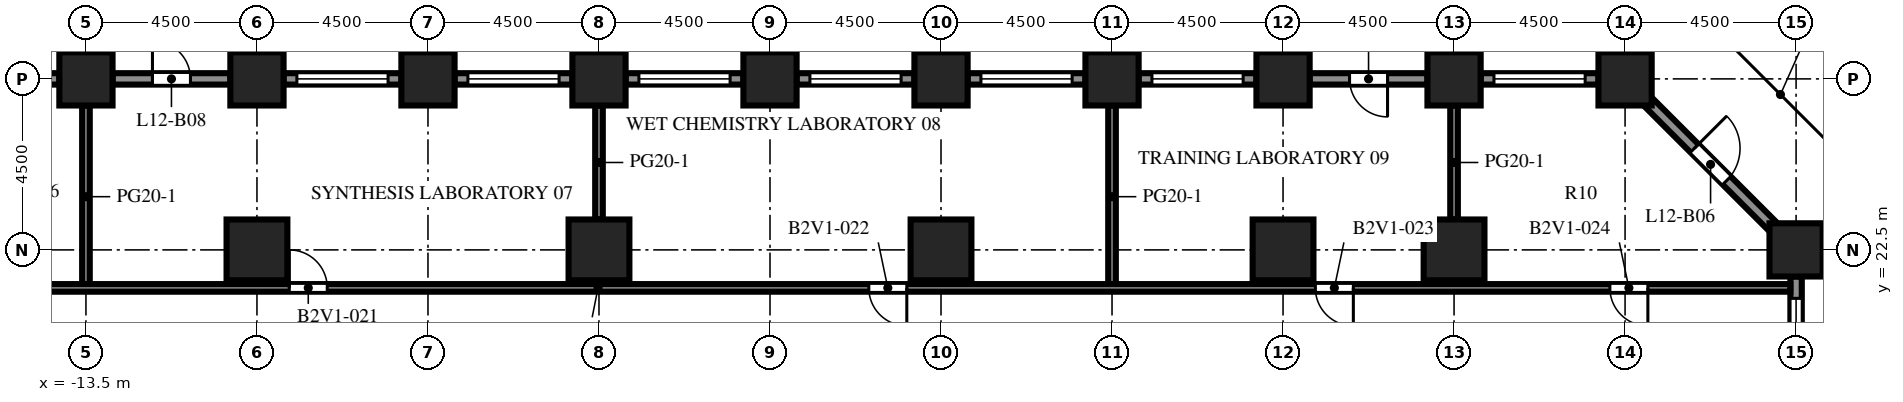
"""IFC4 building model, lengths in metres.
Left out: names, types, materials, properties, quantities, classifications, styles, units other than length and angle.
Written with IfcOpenShell. Run it as: python <this file> out.ifc"""

import sys

from ifc_helpers import new_model, si_unit, direction, frame, frame_2d, origin, origin_2d, place, context, subcontext, project, spatial, rectangle, extrude, element, fill, save


model = new_model("IFC4")
c1 = context("Model", 3, precision=1e-05, world=origin(), true_north=direction((0.0, 1.0)))
c2 = subcontext(c1, "Body", "Model", "MODEL_VIEW")
j1 = project(units=[si_unit("LENGTHUNIT", "METRE"), si_unit("PLANEANGLEUNIT", "RADIAN")], contexts=[c1])
p1 = place(None, origin())
s1 = spatial("IfcSite", under=j1, at=p1, CompositionType="ELEMENT")
p2 = place(p1, origin())
s2 = spatial("IfcBuilding", under=s1, at=p2, CompositionType="ELEMENT")
p3 = place(p2, frame((0.0, 0.0, 54.2)))
s3 = spatial("IfcBuildingStorey", under=s2, at=p3, CompositionType="ELEMENT", Elevation=54.2)
for number, where, z_axis, x_axis in (
    (1, (-13.5, 27.0, 0.0), (0.0, 0.0, 1.0), (1.0, 0.0, 0.0)),
    (2, (-9.0, 27.0, 0.0), (0.0, 0.0, 1.0), (1.0, 0.0, 0.0)),
    (3, (-4.5, 27.0, 0.0), (0.0, 0.0, 1.0), (1.0, 0.0, 0.0)),
    (4, (0.0, 27.0, 0.0), (0.0, 0.0, 1.0), (1.0, 0.0, 0.0)),
    (5, (4.5, 27.0, 0.0), (0.0, 0.0, 1.0), (1.0, 0.0, 0.0)),
    (6, (9.0, 27.0, 0.0), (0.0, 0.0, 1.0), (1.0, 0.0, 0.0)),
    (7, (13.5, 27.0, 0.0), (0.0, 0.0, 1.0), (1.0, 0.0, 0.0)),
    (8, (18.0, 27.0, 0.0), (0.0, 0.0, 1.0), (1.0, 0.0, 0.0)),
    (9, (22.5, 27.0, 0.0), (0.0, 0.0, 1.0), (1.0, 0.0, 0.0)),
    (10, (27.0, 27.0, 0.0), (0.0, 0.0, 1.0), (1.0, 0.0, 0.0)),
    (11, (31.5, 22.5, 0.0), (0.0, 0.0, 1.0), (1.0, 0.0, 0.0)),
):
    element("IfcColumn", number, at=place(p3, frame(where, z_axis=z_axis, x_axis=x_axis)), inside=s3, PredefinedType="COLUMN", context=c2, shape_type="SweptSolid", body=[
        extrude(rectangle(XDim=1.4, YDim=1.4, at=origin_2d()), origin(), (0.0, 0.0, 1.0), 4.1),
    ])
for number, where, z_axis, x_axis in (
    (12, (-9.0, 22.5, 0.0), (0.0, 0.0, 1.0), (1.0, 0.0, 0.0)),
    (13, (0.0, 22.5, 0.0), (0.0, 0.0, 1.0), (1.0, 0.0, 0.0)),
    (14, (9.0, 22.5, 0.0), (0.0, 0.0, 1.0), (1.0, 0.0, 0.0)),
    (15, (18.0, 22.5, 0.0), (0.0, 0.0, 1.0), (1.0, 0.0, 0.0)),
    (16, (22.5, 22.5, 0.0), (0.0, 0.0, 1.0), (1.0, 0.0, 0.0)),
):
    element("IfcColumn", number, at=place(p3, frame(where, z_axis=z_axis, x_axis=x_axis)), inside=s3, PredefinedType="COLUMN", context=c2, shape_type="SweptSolid", body=[
        extrude(rectangle(XDim=1.6, YDim=1.6, at=origin_2d()), origin(), (0.0, 0.0, 1.0), 4.1),
    ])
p4 = place(p3, frame((31.5, 21.8, 0.0), z_axis=(0.0, 0.0, 1.0), x_axis=(0.0, -1.0, 0.0)))
e17 = element("IfcWall", 17, at=p4, inside=s3, PredefinedType="SOLIDWALL", context=c2, shape_type="SweptSolid", body=[
    extrude(rectangle(XDim=3.1, YDim=0.3, at=frame_2d((1.55, 0.0))), origin(), (0.0, 0.0, 1.0), 2.75),
])
p5 = place(p4, frame((0.575, 0.0, 0.8)))
e18 = element("IfcOpeningElement", 18, at=p5, cuts=e17, PredefinedType="OPENING", context=c2, shape_type="SweptSolid", body=[
    extrude(rectangle(XDim=2.4, YDim=1.7, at=frame_2d((1.2, 0.85))), frame((0.0, 0.16, 0.0), z_axis=(0.0, -1.0, 0.0), x_axis=(1.0, 0.0, 0.0)), (0.0, 0.0, 1.0), 0.32),
])
p6 = place(p3, frame((27.594, 26.406, 0.0), z_axis=(0.0, 0.0, 1.0), x_axis=(0.707106781187, -0.707106781187, 0.0)))
e19 = element("IfcWall", 19, at=p6, inside=s3, PredefinedType="SOLIDWALL", context=c2, shape_type="SweptSolid", body=[
    extrude(rectangle(XDim=4.684, YDim=0.3, at=frame_2d((2.342, 0.0))), origin(), (0.0, 0.0, 1.0), 2.75),
])
p7 = place(p6, frame((1.742, 0.0, 0.0)))
e20 = element("IfcOpeningElement", 20, at=p7, cuts=e19, PredefinedType="OPENING", context=c2, shape_type="SweptSolid", body=[
    extrude(rectangle(XDim=1.2, YDim=2.2, at=frame_2d((0.6, 1.1))), frame((0.0, 0.16, 0.0), z_axis=(0.0, -1.0, 0.0), x_axis=(1.0, 0.0, 0.0)), (0.0, 0.0, 1.0), 0.32),
])
p8 = place(p3, frame((23.2, 27.0, 0.0), z_axis=(0.0, 0.0, 1.0), x_axis=(1.0, 0.0, 0.0)))
e21 = element("IfcWall", 21, at=p8, inside=s3, PredefinedType="SOLIDWALL", context=c2, shape_type="SweptSolid", body=[
    extrude(rectangle(XDim=3.1, YDim=0.3, at=frame_2d((1.55, 0.0))), origin(), (0.0, 0.0, 1.0), 2.75),
])
p9 = place(p8, frame((0.35, 0.0, 0.8)))
e22 = element("IfcOpeningElement", 22, at=p9, cuts=e21, PredefinedType="OPENING", context=c2, shape_type="SweptSolid", body=[
    extrude(rectangle(XDim=2.4, YDim=1.7, at=frame_2d((1.2, 0.85))), frame((0.0, 0.16, 0.0), z_axis=(0.0, -1.0, 0.0), x_axis=(1.0, 0.0, 0.0)), (0.0, 0.0, 1.0), 0.32),
])
p10 = place(p3, frame((18.7, 27.0, 0.0), z_axis=(0.0, 0.0, 1.0), x_axis=(1.0, 0.0, 0.0)))
e23 = element("IfcWall", 23, at=p10, inside=s3, PredefinedType="SOLIDWALL", context=c2, shape_type="SweptSolid", body=[
    extrude(rectangle(XDim=3.1, YDim=0.3, at=frame_2d((1.55, 0.0))), origin(), (0.0, 0.0, 1.0), 2.75),
])
p11 = place(p10, frame((1.05, 0.0, 0.0)))
e24 = element("IfcOpeningElement", 24, at=p11, cuts=e23, PredefinedType="OPENING", context=c2, shape_type="SweptSolid", body=[
    extrude(rectangle(XDim=1.0, YDim=2.2, at=frame_2d((0.5, 1.1))), frame((0.0, 0.16, 0.0), z_axis=(0.0, -1.0, 0.0), x_axis=(1.0, 0.0, 0.0)), (0.0, 0.0, 1.0), 0.32),
])
p12 = place(p3, frame((14.2, 27.0, 0.0), z_axis=(0.0, 0.0, 1.0), x_axis=(1.0, 0.0, 0.0)))
e25 = element("IfcWall", 25, at=p12, inside=s3, PredefinedType="SOLIDWALL", context=c2, shape_type="SweptSolid", body=[
    extrude(rectangle(XDim=3.1, YDim=0.3, at=frame_2d((1.55, 0.0))), origin(), (0.0, 0.0, 1.0), 2.75),
])
p13 = place(p12, frame((0.35, 0.0, 0.8)))
e26 = element("IfcOpeningElement", 26, at=p13, cuts=e25, PredefinedType="OPENING", context=c2, shape_type="SweptSolid", body=[
    extrude(rectangle(XDim=2.4, YDim=1.7, at=frame_2d((1.2, 0.85))), frame((0.0, 0.16, 0.0), z_axis=(0.0, -1.0, 0.0), x_axis=(1.0, 0.0, 0.0)), (0.0, 0.0, 1.0), 0.32),
])
p14 = place(p3, frame((9.7, 27.0, 0.0), z_axis=(0.0, 0.0, 1.0), x_axis=(1.0, 0.0, 0.0)))
e27 = element("IfcWall", 27, at=p14, inside=s3, PredefinedType="SOLIDWALL", context=c2, shape_type="SweptSolid", body=[
    extrude(rectangle(XDim=3.1, YDim=0.3, at=frame_2d((1.55, 0.0))), origin(), (0.0, 0.0, 1.0), 2.75),
])
p15 = place(p14, frame((0.35, 0.0, 0.8)))
e28 = element("IfcOpeningElement", 28, at=p15, cuts=e27, PredefinedType="OPENING", context=c2, shape_type="SweptSolid", body=[
    extrude(rectangle(XDim=2.4, YDim=1.7, at=frame_2d((1.2, 0.85))), frame((0.0, 0.16, 0.0), z_axis=(0.0, -1.0, 0.0), x_axis=(1.0, 0.0, 0.0)), (0.0, 0.0, 1.0), 0.32),
])
p16 = place(p3, frame((5.2, 27.0, 0.0), z_axis=(0.0, 0.0, 1.0), x_axis=(1.0, 0.0, 0.0)))
e29 = element("IfcWall", 29, at=p16, inside=s3, PredefinedType="SOLIDWALL", context=c2, shape_type="SweptSolid", body=[
    extrude(rectangle(XDim=3.1, YDim=0.3, at=frame_2d((1.55, 0.0))), origin(), (0.0, 0.0, 1.0), 2.75),
])
p17 = place(p16, frame((0.35, 0.0, 0.8)))
e30 = element("IfcOpeningElement", 30, at=p17, cuts=e29, PredefinedType="OPENING", context=c2, shape_type="SweptSolid", body=[
    extrude(rectangle(XDim=2.4, YDim=1.7, at=frame_2d((1.2, 0.85))), frame((0.0, 0.16, 0.0), z_axis=(0.0, -1.0, 0.0), x_axis=(1.0, 0.0, 0.0)), (0.0, 0.0, 1.0), 0.32),
])
p18 = place(p3, frame((0.7, 27.0, 0.0), z_axis=(0.0, 0.0, 1.0), x_axis=(1.0, 0.0, 0.0)))
e31 = element("IfcWall", 31, at=p18, inside=s3, PredefinedType="SOLIDWALL", context=c2, shape_type="SweptSolid", body=[
    extrude(rectangle(XDim=3.1, YDim=0.3, at=frame_2d((1.55, 0.0))), origin(), (0.0, 0.0, 1.0), 2.75),
])
p19 = place(p18, frame((0.35, 0.0, 0.8)))
e32 = element("IfcOpeningElement", 32, at=p19, cuts=e31, PredefinedType="OPENING", context=c2, shape_type="SweptSolid", body=[
    extrude(rectangle(XDim=2.4, YDim=1.7, at=frame_2d((1.2, 0.85))), frame((0.0, 0.16, 0.0), z_axis=(0.0, -1.0, 0.0), x_axis=(1.0, 0.0, 0.0)), (0.0, 0.0, 1.0), 0.32),
])
p20 = place(p3, frame((-3.8, 27.0, 0.0), z_axis=(0.0, 0.0, 1.0), x_axis=(1.0, 0.0, 0.0)))
e33 = element("IfcWall", 33, at=p20, inside=s3, PredefinedType="SOLIDWALL", context=c2, shape_type="SweptSolid", body=[
    extrude(rectangle(XDim=3.1, YDim=0.3, at=frame_2d((1.55, 0.0))), origin(), (0.0, 0.0, 1.0), 2.75),
])
p21 = place(p20, frame((0.35, 0.0, 0.8)))
e34 = element("IfcOpeningElement", 34, at=p21, cuts=e33, PredefinedType="OPENING", context=c2, shape_type="SweptSolid", body=[
    extrude(rectangle(XDim=2.4, YDim=1.7, at=frame_2d((1.2, 0.85))), frame((0.0, 0.16, 0.0), z_axis=(0.0, -1.0, 0.0), x_axis=(1.0, 0.0, 0.0)), (0.0, 0.0, 1.0), 0.32),
])
p22 = place(p3, frame((-8.3, 27.0, 0.0), z_axis=(0.0, 0.0, 1.0), x_axis=(1.0, 0.0, 0.0)))
e35 = element("IfcWall", 35, at=p22, inside=s3, PredefinedType="SOLIDWALL", context=c2, shape_type="SweptSolid", body=[
    extrude(rectangle(XDim=3.1, YDim=0.3, at=frame_2d((1.55, 0.0))), origin(), (0.0, 0.0, 1.0), 2.75),
])
p23 = place(p22, frame((0.35, 0.0, 0.8)))
e36 = element("IfcOpeningElement", 36, at=p23, cuts=e35, PredefinedType="OPENING", context=c2, shape_type="SweptSolid", body=[
    extrude(rectangle(XDim=2.4, YDim=1.7, at=frame_2d((1.2, 0.85))), frame((0.0, 0.16, 0.0), z_axis=(0.0, -1.0, 0.0), x_axis=(1.0, 0.0, 0.0)), (0.0, 0.0, 1.0), 0.32),
])
p24 = place(p3, frame((-12.8, 27.0, 0.0), z_axis=(0.0, 0.0, 1.0), x_axis=(1.0, 0.0, 0.0)))
e37 = element("IfcWall", 37, at=p24, inside=s3, PredefinedType="SOLIDWALL", context=c2, shape_type="SweptSolid", body=[
    extrude(rectangle(XDim=3.1, YDim=0.3, at=frame_2d((1.55, 0.0))), origin(), (0.0, 0.0, 1.0), 2.75),
])
p25 = place(p24, frame((1.05, 0.0, 0.0)))
e38 = element("IfcOpeningElement", 38, at=p25, cuts=e37, PredefinedType="OPENING", context=c2, shape_type="SweptSolid", body=[
    extrude(rectangle(XDim=1.0, YDim=2.2, at=frame_2d((0.5, 1.1))), frame((0.0, 0.16, 0.0), z_axis=(0.0, -1.0, 0.0), x_axis=(1.0, 0.0, 0.0)), (0.0, 0.0, 1.0), 0.32),
])
p26 = place(p3, frame((-17.3, 27.0, 0.0), z_axis=(0.0, 0.0, 1.0), x_axis=(1.0, 0.0, 0.0)))
e39 = element("IfcWall", 39, at=p26, inside=s3, PredefinedType="SOLIDWALL", context=c2, shape_type="SweptSolid", body=[
    extrude(rectangle(XDim=3.1, YDim=0.3, at=frame_2d((1.55, 0.0))), origin(), (0.0, 0.0, 1.0), 2.75),
])
p27 = place(p26, frame((0.35, 0.0, 0.8)))
e40 = element("IfcOpeningElement", 40, at=p27, cuts=e39, PredefinedType="OPENING", context=c2, shape_type="SweptSolid", body=[
    extrude(rectangle(XDim=2.4, YDim=1.7, at=frame_2d((1.2, 0.85))), frame((0.0, 0.16, 0.0), z_axis=(0.0, -1.0, 0.0), x_axis=(1.0, 0.0, 0.0)), (0.0, 0.0, 1.0), 0.32),
])
p28 = place(p3, frame((-13.5, 21.5, 0.0), z_axis=(0.0, 0.0, 1.0), x_axis=(0.0, 1.0, 0.0)))
e41 = element("IfcWall", 41, at=p28, inside=s3, PredefinedType="PARTITIONING", context=c2, shape_type="SweptSolid", body=[
    extrude(rectangle(XDim=4.8, YDim=0.2, at=frame_2d((2.4, 0.0))), origin(), (0.0, 0.0, 1.0), 3.65),
])
p29 = place(p3, frame((0.0, 23.3, 0.0), z_axis=(0.0, 0.0, 1.0), x_axis=(0.0, 1.0, 0.0)))
e42 = element("IfcWall", 42, at=p29, inside=s3, PredefinedType="PARTITIONING", context=c2, shape_type="SweptSolid", body=[
    extrude(rectangle(XDim=3.0, YDim=0.2, at=frame_2d((1.5, 0.0))), origin(), (0.0, 0.0, 1.0), 3.65),
])
p30 = place(p3, frame((13.5, 21.5, 0.0), z_axis=(0.0, 0.0, 1.0), x_axis=(0.0, 1.0, 0.0)))
e43 = element("IfcWall", 43, at=p30, inside=s3, PredefinedType="PARTITIONING", context=c2, shape_type="SweptSolid", body=[
    extrude(rectangle(XDim=4.8, YDim=0.2, at=frame_2d((2.4, 0.0))), origin(), (0.0, 0.0, 1.0), 3.65),
])
p31 = place(p3, frame((22.5, 23.3, 0.0), z_axis=(0.0, 0.0, 1.0), x_axis=(0.0, 1.0, 0.0)))
e44 = element("IfcWall", 44, at=p31, inside=s3, PredefinedType="PARTITIONING", context=c2, shape_type="SweptSolid", body=[
    extrude(rectangle(XDim=3.0, YDim=0.2, at=frame_2d((1.5, 0.0))), origin(), (0.0, 0.0, 1.0), 3.65),
])
p32 = place(p3, frame((-22.35, 21.5, 0.0), z_axis=(0.0, 0.0, 1.0), x_axis=(1.0, 0.0, 0.0)))
e45 = element("IfcWall", 45, at=p32, inside=s3, PredefinedType="PARTITIONING", context=c2, shape_type="SweptSolid", body=[
    extrude(rectangle(XDim=53.7, YDim=0.2, at=frame_2d((26.85, 0.0))), origin(), (0.0, 0.0, 1.0), 3.65),
])
p33 = place(p32, frame((3.7, 0.0, 0.0)))
e46 = element("IfcOpeningElement", 46, at=p33, cuts=e45, PredefinedType="OPENING", context=c2, shape_type="SweptSolid", body=[
    extrude(rectangle(XDim=1.0, YDim=2.1, at=frame_2d((0.5, 1.05))), frame((0.0, 0.11, 0.0), z_axis=(0.0, -1.0, 0.0), x_axis=(1.0, 0.0, 0.0)), (0.0, 0.0, 1.0), 0.22),
])
p34 = place(p32, frame((14.2, 0.0, 0.0)))
e47 = element("IfcOpeningElement", 47, at=p34, cuts=e45, PredefinedType="OPENING", context=c2, shape_type="SweptSolid", body=[
    extrude(rectangle(XDim=1.0, YDim=2.1, at=frame_2d((0.5, 1.05))), frame((0.0, 0.11, 0.0), z_axis=(0.0, -1.0, 0.0), x_axis=(1.0, 0.0, 0.0)), (0.0, 0.0, 1.0), 0.22),
])
p35 = place(p32, frame((29.45, 0.0, 0.0)))
e48 = element("IfcOpeningElement", 48, at=p35, cuts=e45, PredefinedType="OPENING", context=c2, shape_type="SweptSolid", body=[
    extrude(rectangle(XDim=1.0, YDim=2.1, at=frame_2d((0.5, 1.05))), frame((0.0, 0.11, 0.0), z_axis=(0.0, -1.0, 0.0), x_axis=(1.0, 0.0, 0.0)), (0.0, 0.0, 1.0), 0.22),
])
p36 = place(p32, frame((41.2, 0.0, 0.0)))
e49 = element("IfcOpeningElement", 49, at=p36, cuts=e45, PredefinedType="OPENING", context=c2, shape_type="SweptSolid", body=[
    extrude(rectangle(XDim=1.0, YDim=2.1, at=frame_2d((0.5, 1.05))), frame((0.0, 0.11, 0.0), z_axis=(0.0, -1.0, 0.0), x_axis=(1.0, 0.0, 0.0)), (0.0, 0.0, 1.0), 0.22),
])
p37 = place(p32, frame((48.95, 0.0, 0.0)))
e50 = element("IfcOpeningElement", 50, at=p37, cuts=e45, PredefinedType="OPENING", context=c2, shape_type="SweptSolid", body=[
    extrude(rectangle(XDim=1.0, YDim=2.1, at=frame_2d((0.5, 1.05))), frame((0.0, 0.11, 0.0), z_axis=(0.0, -1.0, 0.0), x_axis=(1.0, 0.0, 0.0)), (0.0, 0.0, 1.0), 0.22),
])
p38 = place(p5, origin())
e51 = element("IfcWindow", 51, at=p38, inside=s3, PartitioningType="SINGLE_PANEL", PredefinedType="WINDOW", context=c2, shape_type="SweptSolid", body=[
    extrude(rectangle(XDim=2.4, YDim=1.7, at=frame_2d((1.2, 0.85))), frame((0.0, 0.03, 0.0), z_axis=(0.0, -1.0, 0.0), x_axis=(1.0, 0.0, 0.0)), (0.0, 0.0, 1.0), 0.06),
])
fill(e18, e51)
p39 = place(p7, origin())
e52 = element("IfcDoor", 52, at=p39, inside=s3, OperationType="SINGLE_SWING_LEFT", PredefinedType="DOOR", context=c2, shape_type="SweptSolid", body=[
    extrude(rectangle(XDim=1.2, YDim=2.2, at=frame_2d((0.6, 1.1))), frame((0.0, 0.025, 0.0), z_axis=(0.0, -1.0, 0.0), x_axis=(1.0, 0.0, 0.0)), (0.0, 0.0, 1.0), 0.05),
])
fill(e20, e52)
p40 = place(p9, origin())
e53 = element("IfcWindow", 53, at=p40, inside=s3, PartitioningType="SINGLE_PANEL", PredefinedType="WINDOW", context=c2, shape_type="SweptSolid", body=[
    extrude(rectangle(XDim=2.4, YDim=1.7, at=frame_2d((1.2, 0.85))), frame((0.0, 0.03, 0.0), z_axis=(0.0, -1.0, 0.0), x_axis=(1.0, 0.0, 0.0)), (0.0, 0.0, 1.0), 0.06),
])
fill(e22, e53)
p41 = place(p11, origin())
e54 = element("IfcDoor", 54, at=p41, inside=s3, OperationType="SINGLE_SWING_RIGHT", PredefinedType="DOOR", context=c2, shape_type="SweptSolid", body=[
    extrude(rectangle(XDim=1.0, YDim=2.2, at=frame_2d((0.5, 1.1))), frame((0.0, 0.025, 0.0), z_axis=(0.0, -1.0, 0.0), x_axis=(1.0, 0.0, 0.0)), (0.0, 0.0, 1.0), 0.05),
])
fill(e24, e54)
p42 = place(p13, origin())
e55 = element("IfcWindow", 55, at=p42, inside=s3, PartitioningType="SINGLE_PANEL", PredefinedType="WINDOW", context=c2, shape_type="SweptSolid", body=[
    extrude(rectangle(XDim=2.4, YDim=1.7, at=frame_2d((1.2, 0.85))), frame((0.0, 0.03, 0.0), z_axis=(0.0, -1.0, 0.0), x_axis=(1.0, 0.0, 0.0)), (0.0, 0.0, 1.0), 0.06),
])
fill(e26, e55)
p43 = place(p15, origin())
e56 = element("IfcWindow", 56, at=p43, inside=s3, PartitioningType="SINGLE_PANEL", PredefinedType="WINDOW", context=c2, shape_type="SweptSolid", body=[
    extrude(rectangle(XDim=2.4, YDim=1.7, at=frame_2d((1.2, 0.85))), frame((0.0, 0.03, 0.0), z_axis=(0.0, -1.0, 0.0), x_axis=(1.0, 0.0, 0.0)), (0.0, 0.0, 1.0), 0.06),
])
fill(e28, e56)
p44 = place(p17, origin())
e57 = element("IfcWindow", 57, at=p44, inside=s3, PartitioningType="SINGLE_PANEL", PredefinedType="WINDOW", context=c2, shape_type="SweptSolid", body=[
    extrude(rectangle(XDim=2.4, YDim=1.7, at=frame_2d((1.2, 0.85))), frame((0.0, 0.03, 0.0), z_axis=(0.0, -1.0, 0.0), x_axis=(1.0, 0.0, 0.0)), (0.0, 0.0, 1.0), 0.06),
])
fill(e30, e57)
p45 = place(p19, origin())
e58 = element("IfcWindow", 58, at=p45, inside=s3, PartitioningType="SINGLE_PANEL", PredefinedType="WINDOW", context=c2, shape_type="SweptSolid", body=[
    extrude(rectangle(XDim=2.4, YDim=1.7, at=frame_2d((1.2, 0.85))), frame((0.0, 0.03, 0.0), z_axis=(0.0, -1.0, 0.0), x_axis=(1.0, 0.0, 0.0)), (0.0, 0.0, 1.0), 0.06),
])
fill(e32, e58)
p46 = place(p21, origin())
e59 = element("IfcWindow", 59, at=p46, inside=s3, PartitioningType="SINGLE_PANEL", PredefinedType="WINDOW", context=c2, shape_type="SweptSolid", body=[
    extrude(rectangle(XDim=2.4, YDim=1.7, at=frame_2d((1.2, 0.85))), frame((0.0, 0.03, 0.0), z_axis=(0.0, -1.0, 0.0), x_axis=(1.0, 0.0, 0.0)), (0.0, 0.0, 1.0), 0.06),
])
fill(e34, e59)
p47 = place(p23, origin())
e60 = element("IfcWindow", 60, at=p47, inside=s3, PartitioningType="SINGLE_PANEL", PredefinedType="WINDOW", context=c2, shape_type="SweptSolid", body=[
    extrude(rectangle(XDim=2.4, YDim=1.7, at=frame_2d((1.2, 0.85))), frame((0.0, 0.03, 0.0), z_axis=(0.0, -1.0, 0.0), x_axis=(1.0, 0.0, 0.0)), (0.0, 0.0, 1.0), 0.06),
])
fill(e36, e60)
p48 = place(p25, origin())
e61 = element("IfcDoor", 61, at=p48, inside=s3, OperationType="SINGLE_SWING_LEFT", PredefinedType="DOOR", context=c2, shape_type="SweptSolid", body=[
    extrude(rectangle(XDim=1.0, YDim=2.2, at=frame_2d((0.5, 1.1))), frame((0.0, 0.025, 0.0), z_axis=(0.0, -1.0, 0.0), x_axis=(1.0, 0.0, 0.0)), (0.0, 0.0, 1.0), 0.05),
])
fill(e38, e61)
p49 = place(p34, origin())
e62 = element("IfcDoor", 62, at=p49, inside=s3, OperationType="SINGLE_SWING_LEFT", PredefinedType="DOOR", context=c2, shape_type="SweptSolid", body=[
    extrude(rectangle(XDim=1.0, YDim=2.1, at=frame_2d((0.5, 1.05))), frame((0.0, 0.025, 0.0), z_axis=(0.0, -1.0, 0.0), x_axis=(1.0, 0.0, 0.0)), (0.0, 0.0, 1.0), 0.05),
])
fill(e47, e62)
p50 = place(p35, origin())
e63 = element("IfcDoor", 63, at=p50, inside=s3, OperationType="SINGLE_SWING_RIGHT", PredefinedType="DOOR", context=c2, shape_type="SweptSolid", body=[
    extrude(rectangle(XDim=1.0, YDim=2.1, at=frame_2d((0.5, 1.05))), frame((0.0, 0.025, 0.0), z_axis=(0.0, -1.0, 0.0), x_axis=(1.0, 0.0, 0.0)), (0.0, 0.0, 1.0), 0.05),
])
fill(e48, e63)
p51 = place(p36, origin())
e64 = element("IfcDoor", 64, at=p51, inside=s3, OperationType="SINGLE_SWING_RIGHT", PredefinedType="DOOR", context=c2, shape_type="SweptSolid", body=[
    extrude(rectangle(XDim=1.0, YDim=2.1, at=frame_2d((0.5, 1.05))), frame((0.0, 0.025, 0.0), z_axis=(0.0, -1.0, 0.0), x_axis=(1.0, 0.0, 0.0)), (0.0, 0.0, 1.0), 0.05),
])
fill(e49, e64)
p52 = place(p37, origin())
e65 = element("IfcDoor", 65, at=p52, inside=s3, OperationType="SINGLE_SWING_RIGHT", PredefinedType="DOOR", context=c2, shape_type="SweptSolid", body=[
    extrude(rectangle(XDim=1.0, YDim=2.1, at=frame_2d((0.5, 1.05))), frame((0.0, 0.025, 0.0), z_axis=(0.0, -1.0, 0.0), x_axis=(1.0, 0.0, 0.0)), (0.0, 0.0, 1.0), 0.05),
])
fill(e50, e65)
save(model, sys.argv[1])
